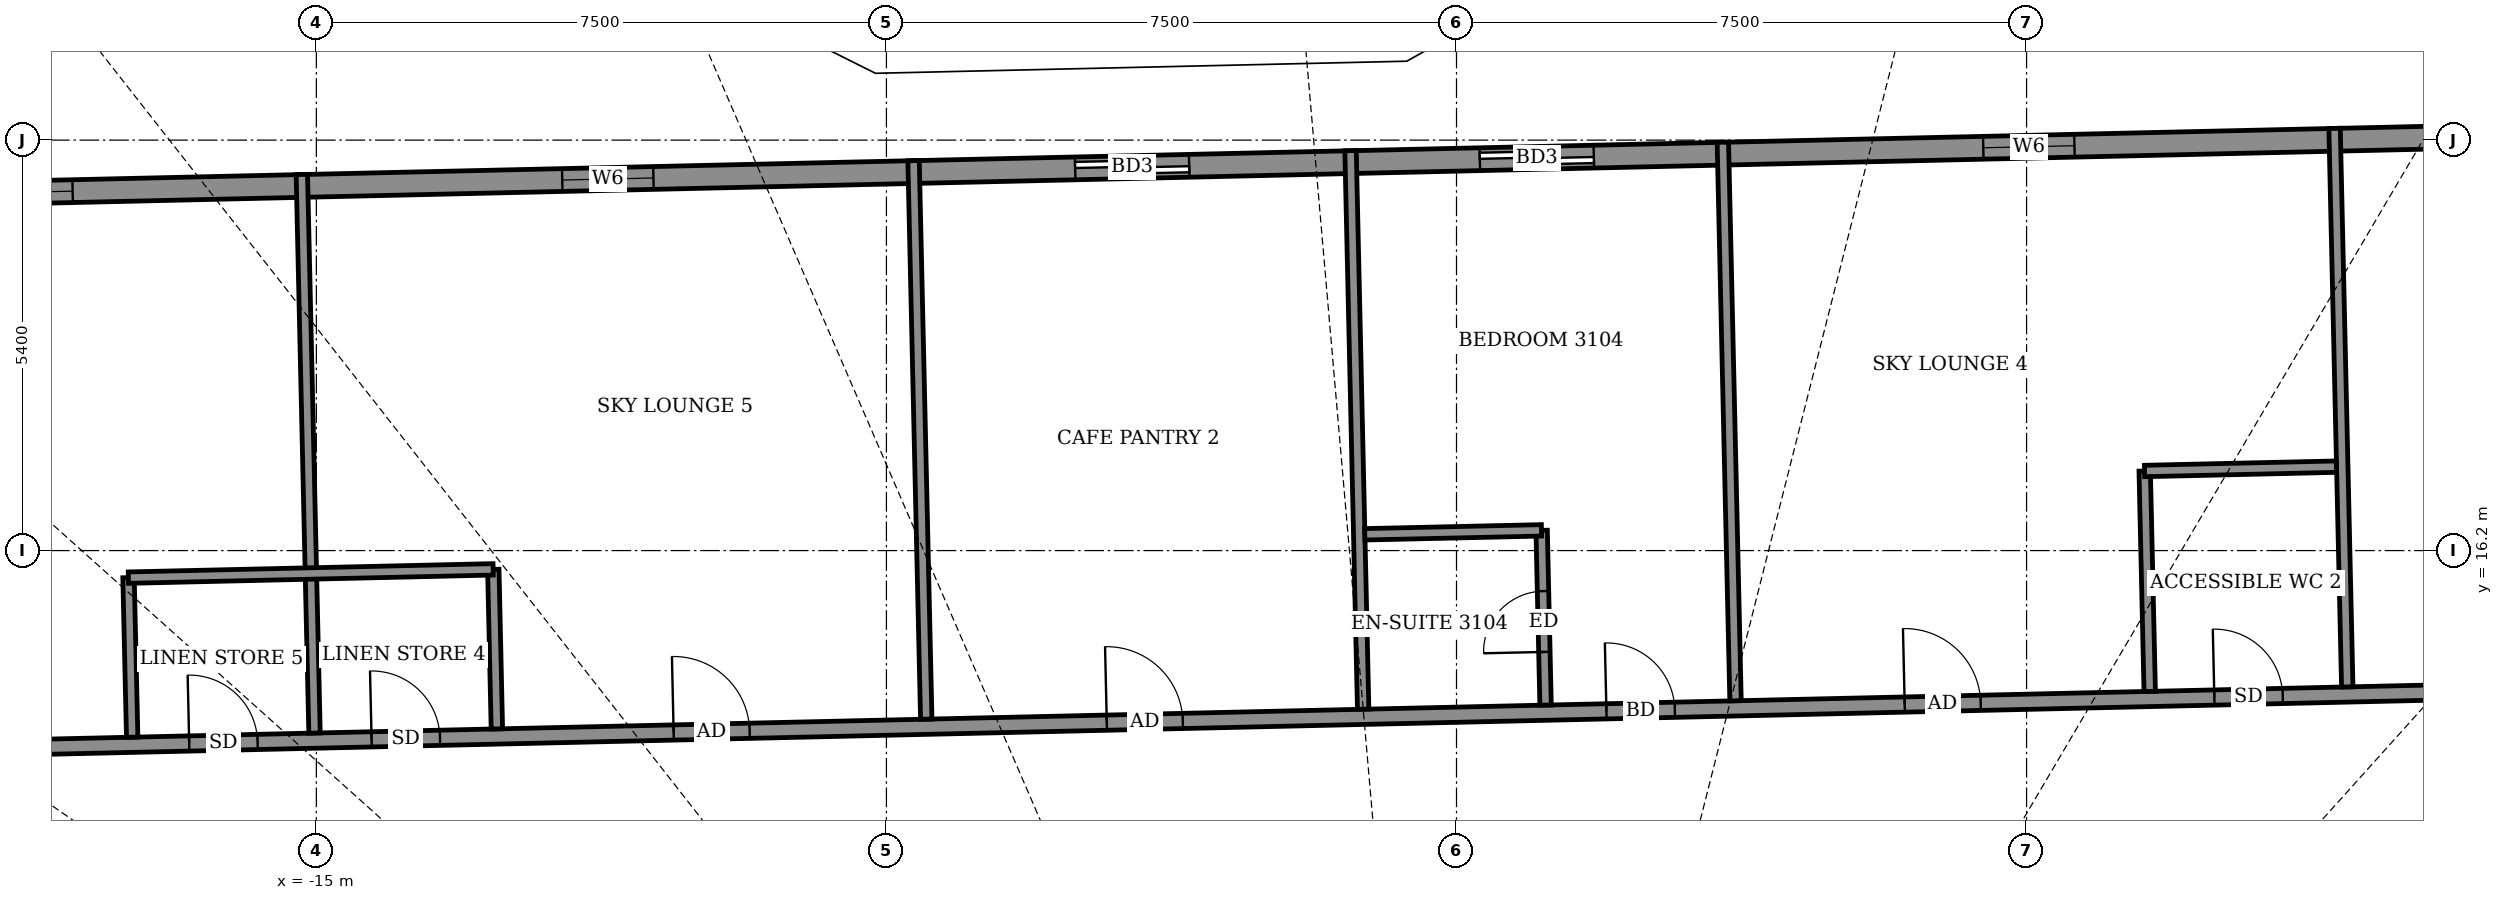
"""IFC4 building model, lengths in metres.
Left out: names, types, materials, properties, quantities, classifications, styles, units other than length and angle.
Written with IfcOpenShell. Run it as: python <this file> out.ifc"""

import sys

from ifc_helpers import new_model, si_unit, direction, frame, frame_2d, origin, place, context, subcontext, project, spatial, rectangle, extrude, element, fill, save


model = new_model("IFC4")
c1 = context("Model", 3, precision=1e-05, world=origin(), true_north=direction((0.0, 1.0)))
c2 = subcontext(c1, "Body", "Model", "MODEL_VIEW")
j1 = project(units=[si_unit("LENGTHUNIT", "METRE"), si_unit("PLANEANGLEUNIT", "RADIAN")], contexts=[c1])
p1 = place(None, origin())
s1 = spatial("IfcSite", under=j1, at=p1, CompositionType="ELEMENT")
p2 = place(p1, origin())
s2 = spatial("IfcBuilding", under=s1, at=p2, CompositionType="ELEMENT")
p3 = place(p2, frame((0.0, 0.0, 125.5)))
s3 = spatial("IfcBuildingStorey", under=s2, at=p3, CompositionType="ELEMENT", Elevation=125.5)
p4 = place(p3, frame((19.396, 21.782, 0.0), z_axis=(0.0, 0.0, 1.0), x_axis=(-0.999742636707, -0.022686126826, 0.0)))
e1 = element("IfcWall", 1, at=p4, inside=s3, PredefinedType="SOLIDWALL", context=c2, shape_type="SweptSolid", body=[
    extrude(rectangle(XDim=42.444, YDim=0.3, at=frame_2d((21.222, 0.0))), origin(), (0.0, 0.0, 1.0), 2.35),
])
p5 = place(p4, frame((3.097, 0.0, 0.0)))
e2 = element("IfcOpeningElement", 2, at=p5, cuts=e1, PredefinedType="OPENING", context=c2, shape_type="SweptSolid", body=[
    extrude(rectangle(XDim=1.5, YDim=2.0, at=frame_2d((0.75, 1.0))), frame((0.0, 0.16, 0.0), z_axis=(0.0, -1.0, 0.0), x_axis=(1.0, 0.0, 0.0)), (0.0, 0.0, 1.0), 0.32),
])
p6 = place(p4, frame((11.269, 0.0, 0.5)))
e3 = element("IfcOpeningElement", 3, at=p6, cuts=e1, PredefinedType="OPENING", context=c2, shape_type="SweptSolid", body=[
    extrude(rectangle(XDim=1.2, YDim=1.1, at=frame_2d((0.6, 0.55))), frame((0.0, 0.16, 0.0), z_axis=(0.0, -1.0, 0.0), x_axis=(1.0, 0.0, 0.0)), (0.0, 0.0, 1.0), 0.32),
])
p7 = place(p4, frame((17.594, 0.0, 0.0)))
e4 = element("IfcOpeningElement", 4, at=p7, cuts=e1, PredefinedType="OPENING", context=c2, shape_type="SweptSolid", body=[
    extrude(rectangle(XDim=1.5, YDim=2.0, at=frame_2d((0.75, 1.0))), frame((0.0, 0.16, 0.0), z_axis=(0.0, -1.0, 0.0), x_axis=(1.0, 0.0, 0.0)), (0.0, 0.0, 1.0), 0.32),
])
p8 = place(p4, frame((22.919, 0.0, 0.0)))
e5 = element("IfcOpeningElement", 5, at=p8, cuts=e1, PredefinedType="OPENING", context=c2, shape_type="SweptSolid", body=[
    extrude(rectangle(XDim=1.5, YDim=2.0, at=frame_2d((0.75, 1.0))), frame((0.0, 0.16, 0.0), z_axis=(0.0, -1.0, 0.0), x_axis=(1.0, 0.0, 0.0)), (0.0, 0.0, 1.0), 0.32),
])
p9 = place(p4, frame((29.969, 0.0, 0.5)))
e6 = element("IfcOpeningElement", 6, at=p9, cuts=e1, PredefinedType="OPENING", context=c2, shape_type="SweptSolid", body=[
    extrude(rectangle(XDim=1.2, YDim=1.1, at=frame_2d((0.6, 0.55))), frame((0.0, 0.16, 0.0), z_axis=(0.0, -1.0, 0.0), x_axis=(1.0, 0.0, 0.0)), (0.0, 0.0, 1.0), 0.32),
])
p10 = place(p4, frame((37.612, 0.0, 0.5)))
e7 = element("IfcOpeningElement", 7, at=p10, cuts=e1, PredefinedType="OPENING", context=c2, shape_type="SweptSolid", body=[
    extrude(rectangle(XDim=1.2, YDim=1.1, at=frame_2d((0.6, 0.55))), frame((0.0, 0.16, 0.0), z_axis=(0.0, -1.0, 0.0), x_axis=(1.0, 0.0, 0.0)), (0.0, 0.0, 1.0), 0.32),
])
p11 = place(p3, frame((-23.764, 13.501, 0.0), z_axis=(0.0, 0.0, 1.0), x_axis=(0.999742440266, 0.022694782029, 0.0)))
e8 = element("IfcWall", 8, at=p11, inside=s3, PredefinedType="PARTITIONING", context=c2, shape_type="SweptSolid", body=[
    extrude(rectangle(XDim=41.245, YDim=0.2, at=frame_2d((20.622, 0.0))), origin(), (0.0, 0.0, 1.0), 2.35),
])
p12 = place(p11, frame((40.045, 0.0, 0.0)))
e9 = element("IfcOpeningElement", 9, at=p12, cuts=e8, PredefinedType="OPENING", context=c2, shape_type="SweptSolid", body=[
    extrude(rectangle(XDim=1.0, YDim=2.1, at=frame_2d((0.5, 1.05))), frame((0.0, 0.11, 0.0), z_axis=(0.0, -1.0, 0.0), x_axis=(1.0, 0.0, 0.0)), (0.0, 0.0, 1.0), 0.22),
])
p13 = place(p11, frame((29.668, 0.0, 0.0)))
e10 = element("IfcOpeningElement", 10, at=p13, cuts=e8, PredefinedType="OPENING", context=c2, shape_type="SweptSolid", body=[
    extrude(rectangle(XDim=1.0, YDim=2.1, at=frame_2d((0.5, 1.05))), frame((0.0, 0.11, 0.0), z_axis=(0.0, -1.0, 0.0), x_axis=(1.0, 0.0, 0.0)), (0.0, 0.0, 1.0), 0.22),
])
p14 = place(p11, frame((33.743, 0.0, 0.0)))
e11 = element("IfcOpeningElement", 11, at=p14, cuts=e8, PredefinedType="OPENING", context=c2, shape_type="SweptSolid", body=[
    extrude(rectangle(XDim=0.9, YDim=2.1, at=frame_2d((0.45, 1.05))), frame((0.0, 0.11, 0.0), z_axis=(0.0, -1.0, 0.0), x_axis=(1.0, 0.0, 0.0)), (0.0, 0.0, 1.0), 0.22),
])
p15 = place(p11, frame((25.743, 0.0, 0.0)))
e12 = element("IfcOpeningElement", 12, at=p15, cuts=e8, PredefinedType="OPENING", context=c2, shape_type="SweptSolid", body=[
    extrude(rectangle(XDim=0.9, YDim=2.1, at=frame_2d((0.45, 1.05))), frame((0.0, 0.11, 0.0), z_axis=(0.0, -1.0, 0.0), x_axis=(1.0, 0.0, 0.0)), (0.0, 0.0, 1.0), 0.22),
])
p16 = place(p11, frame((19.168, 0.0, 0.0)))
e13 = element("IfcOpeningElement", 13, at=p16, cuts=e8, PredefinedType="OPENING", context=c2, shape_type="SweptSolid", body=[
    extrude(rectangle(XDim=1.0, YDim=2.1, at=frame_2d((0.5, 1.05))), frame((0.0, 0.11, 0.0), z_axis=(0.0, -1.0, 0.0), x_axis=(1.0, 0.0, 0.0)), (0.0, 0.0, 1.0), 0.22),
])
p17 = place(p11, frame((13.468, 0.0, 0.0)))
e14 = element("IfcOpeningElement", 14, at=p17, cuts=e8, PredefinedType="OPENING", context=c2, shape_type="SweptSolid", body=[
    extrude(rectangle(XDim=1.0, YDim=2.1, at=frame_2d((0.5, 1.05))), frame((0.0, 0.11, 0.0), z_axis=(0.0, -1.0, 0.0), x_axis=(1.0, 0.0, 0.0)), (0.0, 0.0, 1.0), 0.22),
])
p18 = place(p11, frame((9.493, 0.0, 0.0)))
e15 = element("IfcOpeningElement", 15, at=p18, cuts=e8, PredefinedType="OPENING", context=c2, shape_type="SweptSolid", body=[
    extrude(rectangle(XDim=0.9, YDim=2.1, at=frame_2d((0.45, 1.05))), frame((0.0, 0.11, 0.0), z_axis=(0.0, -1.0, 0.0), x_axis=(1.0, 0.0, 0.0)), (0.0, 0.0, 1.0), 0.22),
])
p19 = place(p11, frame((0.643, 0.0, 0.0)))
e16 = element("IfcOpeningElement", 16, at=p19, cuts=e8, PredefinedType="OPENING", context=c2, shape_type="SweptSolid", body=[
    extrude(rectangle(XDim=1.0, YDim=2.1, at=frame_2d((0.5, 1.05))), frame((0.0, 0.11, 0.0), z_axis=(0.0, -1.0, 0.0), x_axis=(1.0, 0.0, 0.0)), (0.0, 0.0, 1.0), 0.22),
])
p20 = place(p11, frame((7.093, 0.0, 0.0)))
e17 = element("IfcOpeningElement", 17, at=p20, cuts=e8, PredefinedType="OPENING", context=c2, shape_type="SweptSolid", body=[
    extrude(rectangle(XDim=0.9, YDim=2.1, at=frame_2d((0.45, 1.05))), frame((0.0, 0.11, 0.0), z_axis=(0.0, -1.0, 0.0), x_axis=(1.0, 0.0, 0.0)), (0.0, 0.0, 1.0), 0.22),
])
p21 = place(p3, frame((-17.423, 13.745, 0.0), z_axis=(0.0, 0.0, 1.0), x_axis=(-0.022792727877, 0.999740212033, 0.0)))
e18 = element("IfcWall", 18, at=p21, inside=s3, PredefinedType="PARTITIONING", context=c2, shape_type="SweptSolid", body=[
    extrude(rectangle(XDim=2.099, YDim=0.15, at=frame_2d((1.05, 0.0))), origin(), (0.0, 0.0, 1.0), 2.55),
])
p22 = place(p3, frame((-15.024, 13.799, 0.0), z_axis=(0.0, 0.0, 1.0), x_axis=(-0.022717633107, 0.999741921271, 0.0)))
e19 = element("IfcWall", 19, at=p22, inside=s3, PredefinedType="PARTITIONING", context=c2, shape_type="SweptSolid", body=[
    extrude(rectangle(XDim=7.351, YDim=0.15, at=frame_2d((3.675, 0.0))), origin(), (0.0, 0.0, 1.0), 2.35),
])
p23 = place(p3, frame((-12.625, 13.854, 0.0), z_axis=(0.0, 0.0, 1.0), x_axis=(-0.022444036695, 0.999748100882, 0.0)))
e20 = element("IfcWall", 20, at=p23, inside=s3, PredefinedType="PARTITIONING", context=c2, shape_type="SweptSolid", body=[
    extrude(rectangle(XDim=2.099, YDim=0.15, at=frame_2d((1.05, 0.0))), origin(), (0.0, 0.0, 1.0), 2.35),
])
p24 = place(p3, frame((-6.976, 13.982, 0.0), z_axis=(0.0, 0.0, 1.0), x_axis=(-0.022719896304, 0.99974186984, 0.0)))
e21 = element("IfcWall", 21, at=p24, inside=s3, PredefinedType="PARTITIONING", context=c2, shape_type="SweptSolid", body=[
    extrude(rectangle(XDim=7.35, YDim=0.15, at=frame_2d((3.675, 0.0))), origin(), (0.0, 0.0, 1.0), 2.55),
])
p25 = place(p3, frame((-1.228, 14.113, 0.0), z_axis=(0.0, 0.0, 1.0), x_axis=(-0.022587849492, 0.99974486198, 0.0)))
e22 = element("IfcWall", 22, at=p25, inside=s3, PredefinedType="PARTITIONING", context=c2, shape_type="SweptSolid", body=[
    extrude(rectangle(XDim=7.35, YDim=0.15, at=frame_2d((3.675, 0.0))), origin(), (0.0, 0.0, 1.0), 2.75),
])
p26 = place(p3, frame((1.172, 14.167, 0.0), z_axis=(0.0, 0.0, 1.0), x_axis=(-0.022612884682, 0.999744296031, 0.0)))
e23 = element("IfcWall", 23, at=p26, inside=s3, PredefinedType="PARTITIONING", context=c2, shape_type="SweptSolid", body=[
    extrude(rectangle(XDim=2.3, YDim=0.15, at=frame_2d((1.15, 0.0))), origin(), (0.0, 0.0, 1.0), 4.05),
])
p27 = place(p26, frame((0.7, 0.0, 0.0)))
e24 = element("IfcOpeningElement", 24, at=p27, cuts=e23, PredefinedType="OPENING", context=c2, shape_type="SweptSolid", body=[
    extrude(rectangle(XDim=0.8, YDim=2.1, at=frame_2d((0.4, 1.05))), frame((0.0, 0.085, 0.0), z_axis=(0.0, -1.0, 0.0), x_axis=(1.0, 0.0, 0.0)), (0.0, 0.0, 1.0), 0.17),
])
p28 = place(p3, frame((3.671, 14.224, 0.0), z_axis=(0.0, 0.0, 1.0), x_axis=(-0.022720650804, 0.999741852694, 0.0)))
e25 = element("IfcWall", 25, at=p28, inside=s3, PredefinedType="PARTITIONING", context=c2, shape_type="SweptSolid", body=[
    extrude(rectangle(XDim=7.35, YDim=0.15, at=frame_2d((3.675, 0.0))), origin(), (0.0, 0.0, 1.0), 2.75),
])
p29 = place(p3, frame((9.12, 14.347, 0.0), z_axis=(0.0, 0.0, 1.0), x_axis=(-0.022807433839, 0.999739876649, 0.0)))
e26 = element("IfcWall", 26, at=p29, inside=s3, PredefinedType="PARTITIONING", context=c2, shape_type="SweptSolid", body=[
    extrude(rectangle(XDim=2.901, YDim=0.15, at=frame_2d((1.45, 0.0))), origin(), (0.0, 0.0, 1.0), 2.55),
])
p30 = place(p3, frame((11.719, 14.406, 0.0), z_axis=(0.0, 0.0, 1.0), x_axis=(-0.022720650804, 0.999741852694, 0.0)))
e27 = element("IfcWall", 27, at=p30, inside=s3, PredefinedType="PARTITIONING", context=c2, shape_type="SweptSolid", body=[
    extrude(rectangle(XDim=7.35, YDim=0.15, at=frame_2d((3.675, 0.0))), origin(), (0.0, 0.0, 1.0), 2.55),
])
p31 = place(p3, frame((-17.473, 15.844, 0.0), z_axis=(0.0, 0.0, 1.0), x_axis=(0.999742675121, 0.022684433919, 0.0)))
e28 = element("IfcWall", 28, at=p31, inside=s3, PredefinedType="PARTITIONING", context=c2, shape_type="SweptSolid", body=[
    extrude(rectangle(XDim=4.8, YDim=0.15, at=frame_2d((2.4, 0.0))), origin(), (0.0, 0.0, 1.0), 2.35),
])
p32 = place(p3, frame((-1.207, 16.414, 0.0), z_axis=(0.0, 0.0, 1.0), x_axis=(0.999749954681, 0.022361308448, 0.0)))
e29 = element("IfcWall", 29, at=p32, inside=s3, PredefinedType="PARTITIONING", context=c2, shape_type="SweptSolid", body=[
    extrude(rectangle(XDim=2.325, YDim=0.15, at=frame_2d((1.163, 0.0))), origin(), (0.0, 0.0, 1.0), 2.75),
])
p33 = place(p3, frame((9.052, 17.247, 0.0), z_axis=(0.0, 0.0, 1.0), x_axis=(0.9997461113, 0.022532486354, 0.0)))
e30 = element("IfcWall", 30, at=p33, inside=s3, PredefinedType="PARTITIONING", context=c2, shape_type="SweptSolid", body=[
    extrude(rectangle(XDim=2.525, YDim=0.15, at=frame_2d((1.262, 0.0))), origin(), (0.0, 0.0, 1.0), 2.55),
])
p34 = place(p6, origin())
e31 = element("IfcWindow", 31, at=p34, inside=s3, PartitioningType="SINGLE_PANEL", PredefinedType="WINDOW", context=c2, shape_type="SweptSolid", body=[
    extrude(rectangle(XDim=1.2, YDim=1.1, at=frame_2d((0.6, 0.55))), frame((0.0, 0.03, 0.0), z_axis=(0.0, -1.0, 0.0), x_axis=(1.0, 0.0, 0.0)), (0.0, 0.0, 1.0), 0.06),
])
fill(e3, e31)
p35 = place(p7, origin())
e32 = element("IfcDoor", 32, at=p35, inside=s3, OperationType="SLIDING_TO_LEFT", PredefinedType="DOOR", context=c2, shape_type="SweptSolid", body=[
    extrude(rectangle(XDim=1.5, YDim=2.0, at=frame_2d((0.75, 1.0))), frame((0.0, 0.025, 0.0), z_axis=(0.0, -1.0, 0.0), x_axis=(1.0, 0.0, 0.0)), (0.0, 0.0, 1.0), 0.05),
])
fill(e4, e32)
p36 = place(p8, origin())
e33 = element("IfcDoor", 33, at=p36, inside=s3, OperationType="SLIDING_TO_LEFT", PredefinedType="DOOR", context=c2, shape_type="SweptSolid", body=[
    extrude(rectangle(XDim=1.5, YDim=2.0, at=frame_2d((0.75, 1.0))), frame((0.0, 0.025, 0.0), z_axis=(0.0, -1.0, 0.0), x_axis=(1.0, 0.0, 0.0)), (0.0, 0.0, 1.0), 0.05),
])
fill(e5, e33)
p37 = place(p9, origin())
e34 = element("IfcWindow", 34, at=p37, inside=s3, PartitioningType="SINGLE_PANEL", PredefinedType="WINDOW", context=c2, shape_type="SweptSolid", body=[
    extrude(rectangle(XDim=1.2, YDim=1.1, at=frame_2d((0.6, 0.55))), frame((0.0, 0.03, 0.0), z_axis=(0.0, -1.0, 0.0), x_axis=(1.0, 0.0, 0.0)), (0.0, 0.0, 1.0), 0.06),
])
fill(e6, e34)
p38 = place(p10, origin())
e35 = element("IfcWindow", 35, at=p38, inside=s3, PartitioningType="SINGLE_PANEL", PredefinedType="WINDOW", context=c2, shape_type="SweptSolid", body=[
    extrude(rectangle(XDim=1.2, YDim=1.1, at=frame_2d((0.6, 0.55))), frame((0.0, 0.03, 0.0), z_axis=(0.0, -1.0, 0.0), x_axis=(1.0, 0.0, 0.0)), (0.0, 0.0, 1.0), 0.06),
])
fill(e7, e35)
p39 = place(p13, origin())
e36 = element("IfcDoor", 36, at=p39, inside=s3, OperationType="SINGLE_SWING_RIGHT", PredefinedType="DOOR", context=c2, shape_type="SweptSolid", body=[
    extrude(rectangle(XDim=1.0, YDim=2.1, at=frame_2d((0.5, 1.05))), frame((0.0, 0.025, 0.0), z_axis=(0.0, -1.0, 0.0), x_axis=(1.0, 0.0, 0.0)), (0.0, 0.0, 1.0), 0.05),
])
fill(e10, e36)
p40 = place(p14, origin())
e37 = element("IfcDoor", 37, at=p40, inside=s3, OperationType="SINGLE_SWING_RIGHT", PredefinedType="DOOR", context=c2, shape_type="SweptSolid", body=[
    extrude(rectangle(XDim=0.9, YDim=2.1, at=frame_2d((0.45, 1.05))), frame((0.0, 0.025, 0.0), z_axis=(0.0, -1.0, 0.0), x_axis=(1.0, 0.0, 0.0)), (0.0, 0.0, 1.0), 0.05),
])
fill(e11, e37)
p41 = place(p15, origin())
e38 = element("IfcDoor", 38, at=p41, inside=s3, OperationType="SINGLE_SWING_RIGHT", PredefinedType="DOOR", context=c2, shape_type="SweptSolid", body=[
    extrude(rectangle(XDim=0.9, YDim=2.1, at=frame_2d((0.45, 1.05))), frame((0.0, 0.025, 0.0), z_axis=(0.0, -1.0, 0.0), x_axis=(1.0, 0.0, 0.0)), (0.0, 0.0, 1.0), 0.05),
])
fill(e12, e38)
p42 = place(p27, origin())
e39 = element("IfcDoor", 39, at=p42, inside=s3, OperationType="SINGLE_SWING_RIGHT", PredefinedType="DOOR", context=c2, shape_type="SweptSolid", body=[
    extrude(rectangle(XDim=0.8, YDim=2.1, at=frame_2d((0.4, 1.05))), frame((0.0, 0.025, 0.0), z_axis=(0.0, -1.0, 0.0), x_axis=(1.0, 0.0, 0.0)), (0.0, 0.0, 1.0), 0.05),
])
fill(e24, e39)
p43 = place(p16, origin())
e40 = element("IfcDoor", 40, at=p43, inside=s3, OperationType="SINGLE_SWING_LEFT", PredefinedType="DOOR", context=c2, shape_type="SweptSolid", body=[
    extrude(rectangle(XDim=1.0, YDim=2.1, at=frame_2d((0.5, 1.05))), frame((0.0, 0.025, 0.0), z_axis=(0.0, -1.0, 0.0), x_axis=(1.0, 0.0, 0.0)), (0.0, 0.0, 1.0), 0.05),
])
fill(e13, e40)
p44 = place(p17, origin())
e41 = element("IfcDoor", 41, at=p44, inside=s3, OperationType="SINGLE_SWING_RIGHT", PredefinedType="DOOR", context=c2, shape_type="SweptSolid", body=[
    extrude(rectangle(XDim=1.0, YDim=2.1, at=frame_2d((0.5, 1.05))), frame((0.0, 0.025, 0.0), z_axis=(0.0, -1.0, 0.0), x_axis=(1.0, 0.0, 0.0)), (0.0, 0.0, 1.0), 0.05),
])
fill(e14, e41)
p45 = place(p18, origin())
e42 = element("IfcDoor", 42, at=p45, inside=s3, OperationType="SINGLE_SWING_LEFT", PredefinedType="DOOR", context=c2, shape_type="SweptSolid", body=[
    extrude(rectangle(XDim=0.9, YDim=2.1, at=frame_2d((0.45, 1.05))), frame((0.0, 0.025, 0.0), z_axis=(0.0, -1.0, 0.0), x_axis=(1.0, 0.0, 0.0)), (0.0, 0.0, 1.0), 0.05),
])
fill(e15, e42)
p46 = place(p20, origin())
e43 = element("IfcDoor", 43, at=p46, inside=s3, OperationType="SINGLE_SWING_RIGHT", PredefinedType="DOOR", context=c2, shape_type="SweptSolid", body=[
    extrude(rectangle(XDim=0.9, YDim=2.1, at=frame_2d((0.45, 1.05))), frame((0.0, 0.025, 0.0), z_axis=(0.0, -1.0, 0.0), x_axis=(1.0, 0.0, 0.0)), (0.0, 0.0, 1.0), 0.05),
])
fill(e17, e43)
save(model, sys.argv[1])
